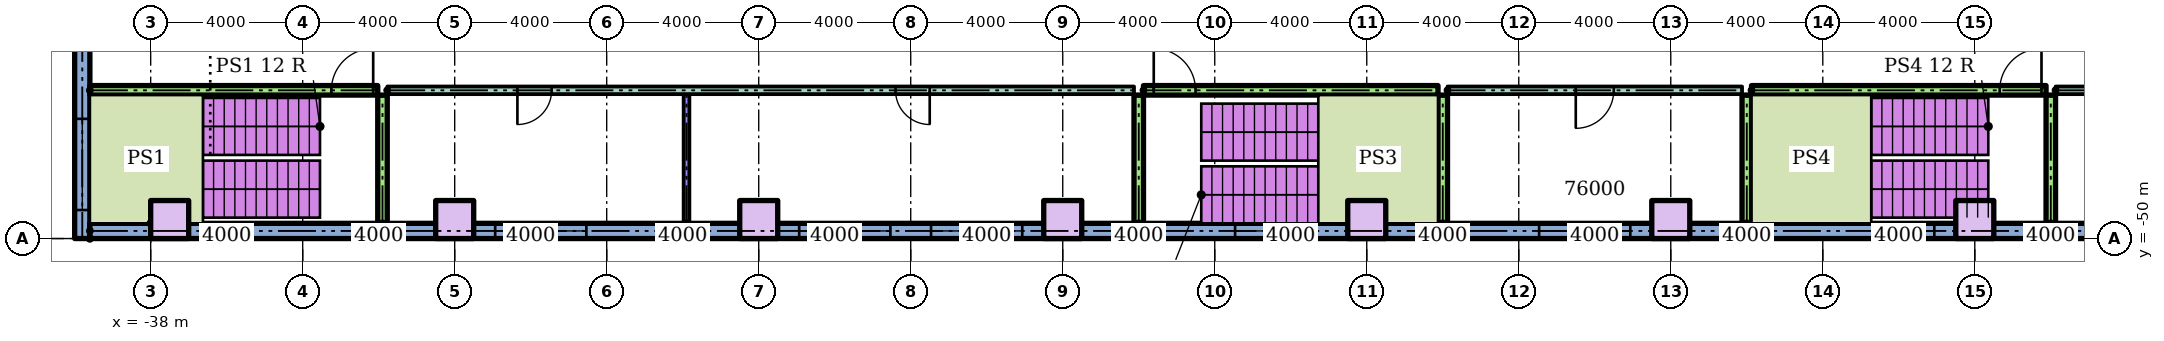
"""IFC4 building model, lengths in metres.
Left out: names, types, materials, properties, quantities, classifications, styles, units other than length and angle.
Written with IfcOpenShell. Run it as: python <this file> out.ifc"""

import sys

from ifc_helpers import new_model, si_unit, direction, frame, frame_2d, origin, origin_2d, place, context, subcontext, project, spatial, rectangle, extrude, element, fill, save


model = new_model("IFC4")
c1 = context("Model", 3, precision=1e-05, world=origin(), true_north=direction((0.0, 1.0)))
c2 = subcontext(c1, "Body", "Model", "MODEL_VIEW")
j1 = project(units=[si_unit("LENGTHUNIT", "METRE"), si_unit("PLANEANGLEUNIT", "RADIAN")], contexts=[c1])
p1 = place(None, origin())
s1 = spatial("IfcSite", under=j1, at=p1, CompositionType="ELEMENT")
p2 = place(p1, origin())
s2 = spatial("IfcBuilding", under=s1, at=p2, CompositionType="ELEMENT")
p3 = place(p2, frame((0.0, 0.0, 22.0)))
s3 = spatial("IfcBuildingStorey", under=s2, at=p3, CompositionType="ELEMENT", Elevation=22.0)
for number, where in (
    (1, (-37.5, -49.5, 0.0)),
    (2, (-30.0, -49.5, 0.0)),
    (3, (-22.0, -49.5, 0.0)),
    (4, (-14.0, -49.5, 0.0)),
    (5, (-6.0, -49.5, 0.0)),
    (6, (2.0, -49.5, 0.0)),
    (7, (10.0, -49.5, 0.0)),
):
    element("IfcColumn", number, at=place(p3, frame(where)), inside=s3, PredefinedType="COLUMN", context=c2, shape_type="SweptSolid", body=[
        extrude(rectangle(XDim=1.0, YDim=1.0, at=origin_2d()), origin(), (0.0, 0.0, 1.0), 3.7),
    ])
p4 = place(p3, frame((-39.8, 20.0, 0.0), z_axis=(0.0, 0.0, 1.0), x_axis=(0.0, -1.0, 0.0)))
e8 = element("IfcWall", 8, at=p4, inside=s3, PredefinedType="STANDARD", context=c2, shape_type="SweptSolid", body=[
    extrude(rectangle(XDim=70.0, YDim=0.4, at=frame_2d((35.0, 0.0))), origin(), (0.0, 0.0, 1.0), 3.7),
])
p5 = place(p4, frame((1.05, 0.0, 0.9)))
e9 = element("IfcOpeningElement", 9, at=p5, cuts=e8, PredefinedType="OPENING", context=c2, shape_type="SweptSolid", body=[
    extrude(rectangle(XDim=2.4, YDim=2.1, at=frame_2d((1.2, 1.05))), frame((0.0, 0.21, 0.0), z_axis=(0.0, -1.0, 0.0), x_axis=(1.0, 0.0, 0.0)), (0.0, 0.0, 1.0), 0.42),
])
p6 = place(p4, frame((5.55, 0.0, 0.9)))
e10 = element("IfcOpeningElement", 10, at=p6, cuts=e8, PredefinedType="OPENING", context=c2, shape_type="SweptSolid", body=[
    extrude(rectangle(XDim=2.4, YDim=2.1, at=frame_2d((1.2, 1.05))), frame((0.0, 0.21, 0.0), z_axis=(0.0, -1.0, 0.0), x_axis=(1.0, 0.0, 0.0)), (0.0, 0.0, 1.0), 0.42),
])
p7 = place(p4, frame((9.863, 0.0, 0.9)))
e11 = element("IfcOpeningElement", 11, at=p7, cuts=e8, PredefinedType="OPENING", context=c2, shape_type="SweptSolid", body=[
    extrude(rectangle(XDim=2.4, YDim=2.1, at=frame_2d((1.2, 1.05))), frame((0.0, 0.21, 0.0), z_axis=(0.0, -1.0, 0.0), x_axis=(1.0, 0.0, 0.0)), (0.0, 0.0, 1.0), 0.42),
])
p8 = place(p4, frame((13.988, 0.0, 0.9)))
e12 = element("IfcOpeningElement", 12, at=p8, cuts=e8, PredefinedType="OPENING", context=c2, shape_type="SweptSolid", body=[
    extrude(rectangle(XDim=2.4, YDim=2.1, at=frame_2d((1.2, 1.05))), frame((0.0, 0.21, 0.0), z_axis=(0.0, -1.0, 0.0), x_axis=(1.0, 0.0, 0.0)), (0.0, 0.0, 1.0), 0.42),
])
p9 = place(p4, frame((18.113, 0.0, 0.9)))
e13 = element("IfcOpeningElement", 13, at=p9, cuts=e8, PredefinedType="OPENING", context=c2, shape_type="SweptSolid", body=[
    extrude(rectangle(XDim=2.4, YDim=2.1, at=frame_2d((1.2, 1.05))), frame((0.0, 0.21, 0.0), z_axis=(0.0, -1.0, 0.0), x_axis=(1.0, 0.0, 0.0)), (0.0, 0.0, 1.0), 0.42),
])
p10 = place(p4, frame((22.238, 0.0, 0.9)))
e14 = element("IfcOpeningElement", 14, at=p10, cuts=e8, PredefinedType="OPENING", context=c2, shape_type="SweptSolid", body=[
    extrude(rectangle(XDim=2.4, YDim=2.1, at=frame_2d((1.2, 1.05))), frame((0.0, 0.21, 0.0), z_axis=(0.0, -1.0, 0.0), x_axis=(1.0, 0.0, 0.0)), (0.0, 0.0, 1.0), 0.42),
])
p11 = place(p4, frame((26.363, 0.0, 0.9)))
e15 = element("IfcOpeningElement", 15, at=p11, cuts=e8, PredefinedType="OPENING", context=c2, shape_type="SweptSolid", body=[
    extrude(rectangle(XDim=2.4, YDim=2.1, at=frame_2d((1.2, 1.05))), frame((0.0, 0.21, 0.0), z_axis=(0.0, -1.0, 0.0), x_axis=(1.0, 0.0, 0.0)), (0.0, 0.0, 1.0), 0.42),
])
p12 = place(p4, frame((30.488, 0.0, 0.9)))
e16 = element("IfcOpeningElement", 16, at=p12, cuts=e8, PredefinedType="OPENING", context=c2, shape_type="SweptSolid", body=[
    extrude(rectangle(XDim=2.4, YDim=2.1, at=frame_2d((1.2, 1.05))), frame((0.0, 0.21, 0.0), z_axis=(0.0, -1.0, 0.0), x_axis=(1.0, 0.0, 0.0)), (0.0, 0.0, 1.0), 0.42),
])
p13 = place(p4, frame((34.613, 0.0, 0.9)))
e17 = element("IfcOpeningElement", 17, at=p13, cuts=e8, PredefinedType="OPENING", context=c2, shape_type="SweptSolid", body=[
    extrude(rectangle(XDim=2.4, YDim=2.1, at=frame_2d((1.2, 1.05))), frame((0.0, 0.21, 0.0), z_axis=(0.0, -1.0, 0.0), x_axis=(1.0, 0.0, 0.0)), (0.0, 0.0, 1.0), 0.42),
])
p14 = place(p4, frame((38.738, 0.0, 0.9)))
e18 = element("IfcOpeningElement", 18, at=p14, cuts=e8, PredefinedType="OPENING", context=c2, shape_type="SweptSolid", body=[
    extrude(rectangle(XDim=2.4, YDim=2.1, at=frame_2d((1.2, 1.05))), frame((0.0, 0.21, 0.0), z_axis=(0.0, -1.0, 0.0), x_axis=(1.0, 0.0, 0.0)), (0.0, 0.0, 1.0), 0.42),
])
p15 = place(p4, frame((42.55, 0.0, 0.9)))
e19 = element("IfcOpeningElement", 19, at=p15, cuts=e8, PredefinedType="OPENING", context=c2, shape_type="SweptSolid", body=[
    extrude(rectangle(XDim=2.4, YDim=2.1, at=frame_2d((1.2, 1.05))), frame((0.0, 0.21, 0.0), z_axis=(0.0, -1.0, 0.0), x_axis=(1.0, 0.0, 0.0)), (0.0, 0.0, 1.0), 0.42),
])
p16 = place(p4, frame((46.05, 0.0, 0.9)))
e20 = element("IfcOpeningElement", 20, at=p16, cuts=e8, PredefinedType="OPENING", context=c2, shape_type="SweptSolid", body=[
    extrude(rectangle(XDim=2.4, YDim=2.1, at=frame_2d((1.2, 1.05))), frame((0.0, 0.21, 0.0), z_axis=(0.0, -1.0, 0.0), x_axis=(1.0, 0.0, 0.0)), (0.0, 0.0, 1.0), 0.42),
])
p17 = place(p4, frame((49.55, 0.0, 0.9)))
e21 = element("IfcOpeningElement", 21, at=p17, cuts=e8, PredefinedType="OPENING", context=c2, shape_type="SweptSolid", body=[
    extrude(rectangle(XDim=2.4, YDim=2.1, at=frame_2d((1.2, 1.05))), frame((0.0, 0.21, 0.0), z_axis=(0.0, -1.0, 0.0), x_axis=(1.0, 0.0, 0.0)), (0.0, 0.0, 1.0), 0.42),
])
p18 = place(p4, frame((53.217, 0.0, 0.9)))
e22 = element("IfcOpeningElement", 22, at=p18, cuts=e8, PredefinedType="OPENING", context=c2, shape_type="SweptSolid", body=[
    extrude(rectangle(XDim=2.4, YDim=2.1, at=frame_2d((1.2, 1.05))), frame((0.0, 0.21, 0.0), z_axis=(0.0, -1.0, 0.0), x_axis=(1.0, 0.0, 0.0)), (0.0, 0.0, 1.0), 0.42),
])
p19 = place(p4, frame((57.05, 0.0, 0.9)))
e23 = element("IfcOpeningElement", 23, at=p19, cuts=e8, PredefinedType="OPENING", context=c2, shape_type="SweptSolid", body=[
    extrude(rectangle(XDim=2.4, YDim=2.1, at=frame_2d((1.2, 1.05))), frame((0.0, 0.21, 0.0), z_axis=(0.0, -1.0, 0.0), x_axis=(1.0, 0.0, 0.0)), (0.0, 0.0, 1.0), 0.42),
])
p20 = place(p4, frame((60.883, 0.0, 0.9)))
e24 = element("IfcOpeningElement", 24, at=p20, cuts=e8, PredefinedType="OPENING", context=c2, shape_type="SweptSolid", body=[
    extrude(rectangle(XDim=2.4, YDim=2.1, at=frame_2d((1.2, 1.05))), frame((0.0, 0.21, 0.0), z_axis=(0.0, -1.0, 0.0), x_axis=(1.0, 0.0, 0.0)), (0.0, 0.0, 1.0), 0.42),
])
p21 = place(p4, frame((66.85, 0.0, 0.9)))
e25 = element("IfcOpeningElement", 25, at=p21, cuts=e8, PredefinedType="OPENING", context=c2, shape_type="SweptSolid", body=[
    extrude(rectangle(XDim=2.4, YDim=2.1, at=frame_2d((1.2, 1.05))), frame((0.0, 0.21, 0.0), z_axis=(0.0, -1.0, 0.0), x_axis=(1.0, 0.0, 0.0)), (0.0, 0.0, 1.0), 0.42),
])
p22 = place(p3, frame((-39.6, -49.8, 0.0)))
e26 = element("IfcWall", 26, at=p22, inside=s3, PredefinedType="STANDARD", context=c2, shape_type="SweptSolid", body=[
    extrude(rectangle(XDim=79.2, YDim=0.4, at=frame_2d((39.6, 0.0))), origin(), (0.0, 0.0, 1.0), 3.7),
])
p23 = place(p22, frame((10.665, 0.0, 0.9)))
e27 = element("IfcOpeningElement", 27, at=p23, cuts=e26, PredefinedType="OPENING", context=c2, shape_type="SweptSolid", body=[
    extrude(rectangle(XDim=2.4, YDim=2.1, at=frame_2d((1.2, 1.05))), frame((0.0, 0.21, 0.0), z_axis=(0.0, -1.0, 0.0), x_axis=(1.0, 0.0, 0.0)), (0.0, 0.0, 1.0), 0.42),
])
p24 = place(p22, frame((18.665, 0.0, 0.9)))
e28 = element("IfcOpeningElement", 28, at=p24, cuts=e26, PredefinedType="OPENING", context=c2, shape_type="SweptSolid", body=[
    extrude(rectangle(XDim=2.4, YDim=2.1, at=frame_2d((1.2, 1.05))), frame((0.0, 0.21, 0.0), z_axis=(0.0, -1.0, 0.0), x_axis=(1.0, 0.0, 0.0)), (0.0, 0.0, 1.0), 0.42),
])
p25 = place(p22, frame((22.135, 0.0, 0.9)))
e29 = element("IfcOpeningElement", 29, at=p25, cuts=e26, PredefinedType="OPENING", context=c2, shape_type="SweptSolid", body=[
    extrude(rectangle(XDim=2.4, YDim=2.1, at=frame_2d((1.2, 1.05))), frame((0.0, 0.21, 0.0), z_axis=(0.0, -1.0, 0.0), x_axis=(1.0, 0.0, 0.0)), (0.0, 0.0, 1.0), 0.42),
])
p26 = place(p22, frame((30.135, 0.0, 0.9)))
e30 = element("IfcOpeningElement", 30, at=p26, cuts=e26, PredefinedType="OPENING", context=c2, shape_type="SweptSolid", body=[
    extrude(rectangle(XDim=2.05, YDim=2.1, at=frame_2d((1.025, 1.05))), frame((0.0, 0.21, 0.0), z_axis=(0.0, -1.0, 0.0), x_axis=(1.0, 0.0, 0.0)), (0.0, 0.0, 1.0), 0.42),
])
p27 = place(p22, frame((38.135, 0.0, 0.9)))
e31 = element("IfcOpeningElement", 31, at=p27, cuts=e26, PredefinedType="OPENING", context=c2, shape_type="SweptSolid", body=[
    extrude(rectangle(XDim=2.4, YDim=2.1, at=frame_2d((1.2, 1.05))), frame((0.0, 0.21, 0.0), z_axis=(0.0, -1.0, 0.0), x_axis=(1.0, 0.0, 0.0)), (0.0, 0.0, 1.0), 0.42),
])
p28 = place(p22, frame((47.015, 0.0, 0.9)))
e32 = element("IfcOpeningElement", 32, at=p28, cuts=e26, PredefinedType="OPENING", context=c2, shape_type="SweptSolid", body=[
    extrude(rectangle(XDim=1.52, YDim=2.1, at=frame_2d((0.76, 1.05))), frame((0.0, 0.21, 0.0), z_axis=(0.0, -1.0, 0.0), x_axis=(1.0, 0.0, 0.0)), (0.0, 0.0, 1.0), 0.42),
])
p29 = place(p22, frame((54.135, 0.0, 0.9)))
e33 = element("IfcOpeningElement", 33, at=p29, cuts=e26, PredefinedType="OPENING", context=c2, shape_type="SweptSolid", body=[
    extrude(rectangle(XDim=2.4, YDim=2.1, at=frame_2d((1.2, 1.05))), frame((0.0, 0.21, 0.0), z_axis=(0.0, -1.0, 0.0), x_axis=(1.0, 0.0, 0.0)), (0.0, 0.0, 1.0), 0.42),
])
p30 = place(p3, frame((-31.775, -46.1, 0.0)))
e34 = element("IfcWall", 34, at=p30, inside=s3, PredefinedType="PARTITIONING", context=c2, shape_type="SweptSolid", body=[
    extrude(rectangle(XDim=19.65, YDim=0.2, at=frame_2d((9.825, 0.0))), origin(), (0.0, 0.0, 1.0), 3.2),
])
p31 = place(p30, frame((3.425, 0.0, 0.0)))
e35 = element("IfcOpeningElement", 35, at=p31, cuts=e34, PredefinedType="OPENING", context=c2, shape_type="SweptSolid", body=[
    extrude(rectangle(XDim=0.9, YDim=2.1, at=frame_2d((0.45, 1.05))), frame((0.0, 0.11, 0.0), z_axis=(0.0, -1.0, 0.0), x_axis=(1.0, 0.0, 0.0)), (0.0, 0.0, 1.0), 0.22),
])
p32 = place(p30, frame((13.375, 0.0, 0.0)))
e36 = element("IfcOpeningElement", 36, at=p32, cuts=e34, PredefinedType="OPENING", context=c2, shape_type="SweptSolid", body=[
    extrude(rectangle(XDim=0.9, YDim=2.1, at=frame_2d((0.45, 1.05))), frame((0.0, 0.11, 0.0), z_axis=(0.0, -1.0, 0.0), x_axis=(1.0, 0.0, 0.0)), (0.0, 0.0, 1.0), 0.22),
])
p33 = place(p3, frame((-3.875, -46.1, 0.0)))
e37 = element("IfcWall", 37, at=p33, inside=s3, PredefinedType="PARTITIONING", context=c2, shape_type="SweptSolid", body=[
    extrude(rectangle(XDim=7.75, YDim=0.2, at=frame_2d((3.875, 0.0))), origin(), (0.0, 0.0, 1.0), 3.2),
])
p34 = place(p33, frame((3.375, 0.0, 0.0)))
e38 = element("IfcOpeningElement", 38, at=p34, cuts=e37, PredefinedType="OPENING", context=c2, shape_type="SweptSolid", body=[
    extrude(rectangle(XDim=1.0, YDim=2.1, at=frame_2d((0.5, 1.05))), frame((0.0, 0.11, 0.0), z_axis=(0.0, -1.0, 0.0), x_axis=(1.0, 0.0, 0.0)), (0.0, 0.0, 1.0), 0.22),
])
p35 = place(p3, frame((12.125, -46.1, 0.0)))
e39 = element("IfcWall", 39, at=p35, inside=s3, PredefinedType="PARTITIONING", context=c2, shape_type="SweptSolid", body=[
    extrude(rectangle(XDim=19.65, YDim=0.2, at=frame_2d((9.825, 0.0))), origin(), (0.0, 0.0, 1.0), 3.2),
])
p36 = place(p35, frame((4.325, 0.0, 0.0)))
e40 = element("IfcOpeningElement", 40, at=p36, cuts=e39, PredefinedType="OPENING", context=c2, shape_type="SweptSolid", body=[
    extrude(rectangle(XDim=0.9, YDim=2.1, at=frame_2d((0.45, 1.05))), frame((0.0, 0.11, 0.0), z_axis=(0.0, -1.0, 0.0), x_axis=(1.0, 0.0, 0.0)), (0.0, 0.0, 1.0), 0.22),
])
p37 = place(p35, frame((15.325, 0.0, 0.0)))
e41 = element("IfcOpeningElement", 41, at=p37, cuts=e39, PredefinedType="OPENING", context=c2, shape_type="SweptSolid", body=[
    extrude(rectangle(XDim=0.9, YDim=2.1, at=frame_2d((0.45, 1.05))), frame((0.0, 0.11, 0.0), z_axis=(0.0, -1.0, 0.0), x_axis=(1.0, 0.0, 0.0)), (0.0, 0.0, 1.0), 0.22),
])
p38 = place(p3, frame((-39.6, -46.1, 0.0)))
e42 = element("IfcWall", 42, at=p38, inside=s3, PredefinedType="SOLIDWALL", context=c2, shape_type="SweptSolid", body=[
    extrude(rectangle(XDim=7.575, YDim=0.25, at=frame_2d((3.788, 0.0))), origin(), (0.0, 0.0, 1.0), 3.7),
])
p39 = place(p38, frame((6.355, 0.0, 0.0)))
e43 = element("IfcOpeningElement", 43, at=p39, cuts=e42, PredefinedType="OPENING", context=c2, shape_type="SweptSolid", body=[
    extrude(rectangle(XDim=1.1, YDim=2.1, at=frame_2d((0.55, 1.05))), frame((0.0, 0.135, 0.0), z_axis=(0.0, -1.0, 0.0), x_axis=(1.0, 0.0, 0.0)), (0.0, 0.0, 1.0), 0.27),
])
p40 = place(p3, frame((-11.875, -46.1, 0.0)))
e44 = element("IfcWall", 44, at=p40, inside=s3, PredefinedType="SOLIDWALL", context=c2, shape_type="SweptSolid", body=[
    extrude(rectangle(XDim=7.75, YDim=0.25, at=frame_2d((3.875, 0.0))), origin(), (0.0, 0.0, 1.0), 3.7),
])
p41 = place(p40, frame((0.27, 0.0, 0.0)))
e45 = element("IfcOpeningElement", 45, at=p41, cuts=e44, PredefinedType="OPENING", context=c2, shape_type="SweptSolid", body=[
    extrude(rectangle(XDim=1.1, YDim=2.1, at=frame_2d((0.55, 1.05))), frame((0.0, 0.135, 0.0), z_axis=(0.0, -1.0, 0.0), x_axis=(1.0, 0.0, 0.0)), (0.0, 0.0, 1.0), 0.27),
])
p42 = place(p3, frame((4.125, -46.1, 0.0)))
e46 = element("IfcWall", 46, at=p42, inside=s3, PredefinedType="SOLIDWALL", context=c2, shape_type="SweptSolid", body=[
    extrude(rectangle(XDim=7.75, YDim=0.25, at=frame_2d((3.875, 0.0))), origin(), (0.0, 0.0, 1.0), 3.7),
])
p43 = place(p42, frame((6.53, 0.0, 0.0)))
e47 = element("IfcOpeningElement", 47, at=p43, cuts=e46, PredefinedType="OPENING", context=c2, shape_type="SweptSolid", body=[
    extrude(rectangle(XDim=1.1, YDim=2.1, at=frame_2d((0.55, 1.05))), frame((0.0, 0.135, 0.0), z_axis=(0.0, -1.0, 0.0), x_axis=(1.0, 0.0, 0.0)), (0.0, 0.0, 1.0), 0.27),
])
p44 = place(p3, frame((-31.9, -49.6, 0.0), z_axis=(0.0, 0.0, 1.0), x_axis=(0.0, 1.0, 0.0)))
e48 = element("IfcWall", 48, at=p44, inside=s3, PredefinedType="SOLIDWALL", context=c2, shape_type="SweptSolid", body=[
    extrude(rectangle(XDim=3.375, YDim=0.25, at=frame_2d((1.688, 0.0))), origin(), (0.0, 0.0, 1.0), 3.7),
])
p45 = place(p3, frame((-23.9, -49.6, 0.0), z_axis=(0.0, 0.0, 1.0), x_axis=(0.0, 1.0, 0.0)))
e49 = element("IfcWall", 49, at=p45, inside=s3, PredefinedType="PARTITIONING", context=c2, shape_type="SweptSolid", body=[
    extrude(rectangle(XDim=3.4, YDim=0.15, at=frame_2d((1.7, 0.0))), origin(), (0.0, 0.0, 1.0), 3.2),
])
for number, where, z_axis, x_axis in (
    (50, (-12.0, -49.6, 0.0), (0.0, 0.0, 1.0), (0.0, 1.0, 0.0)),
    (51, (-4.0, -49.6, 0.0), (0.0, 0.0, 1.0), (0.0, 1.0, 0.0)),
    (52, (4.0, -49.6, 0.0), (0.0, 0.0, 1.0), (0.0, 1.0, 0.0)),
    (53, (12.0, -49.6, 0.0), (0.0, 0.0, 1.0), (0.0, 1.0, 0.0)),
):
    element("IfcWall", number, at=place(p3, frame(where, z_axis=z_axis, x_axis=x_axis)), inside=s3, PredefinedType="SOLIDWALL", context=c2, shape_type="SweptSolid", body=[
        extrude(rectangle(XDim=3.375, YDim=0.25, at=frame_2d((1.688, 0.0))), origin(), (0.0, 0.0, 1.0), 3.7),
    ])
p46 = place(p21, origin())
e54 = element("IfcWindow", 54, at=p46, inside=s3, PartitioningType="SINGLE_PANEL", PredefinedType="WINDOW", context=c2, shape_type="SweptSolid", body=[
    extrude(rectangle(XDim=2.4, YDim=2.1, at=frame_2d((1.2, 1.05))), frame((0.0, 0.03, 0.0), z_axis=(0.0, -1.0, 0.0), x_axis=(1.0, 0.0, 0.0)), (0.0, 0.0, 1.0), 0.06),
])
fill(e25, e54)
p47 = place(p23, origin())
e55 = element("IfcWindow", 55, at=p47, inside=s3, PartitioningType="SINGLE_PANEL", PredefinedType="WINDOW", context=c2, shape_type="SweptSolid", body=[
    extrude(rectangle(XDim=2.4, YDim=2.1, at=frame_2d((1.2, 1.05))), frame((0.0, 0.03, 0.0), z_axis=(0.0, -1.0, 0.0), x_axis=(1.0, 0.0, 0.0)), (0.0, 0.0, 1.0), 0.06),
])
fill(e27, e55)
p48 = place(p24, origin())
e56 = element("IfcWindow", 56, at=p48, inside=s3, PartitioningType="SINGLE_PANEL", PredefinedType="WINDOW", context=c2, shape_type="SweptSolid", body=[
    extrude(rectangle(XDim=2.4, YDim=2.1, at=frame_2d((1.2, 1.05))), frame((0.0, 0.03, 0.0), z_axis=(0.0, -1.0, 0.0), x_axis=(1.0, 0.0, 0.0)), (0.0, 0.0, 1.0), 0.06),
])
fill(e28, e56)
p49 = place(p25, origin())
e57 = element("IfcWindow", 57, at=p49, inside=s3, PartitioningType="SINGLE_PANEL", PredefinedType="WINDOW", context=c2, shape_type="SweptSolid", body=[
    extrude(rectangle(XDim=2.4, YDim=2.1, at=frame_2d((1.2, 1.05))), frame((0.0, 0.03, 0.0), z_axis=(0.0, -1.0, 0.0), x_axis=(1.0, 0.0, 0.0)), (0.0, 0.0, 1.0), 0.06),
])
fill(e29, e57)
p50 = place(p26, origin())
e58 = element("IfcWindow", 58, at=p50, inside=s3, PartitioningType="SINGLE_PANEL", PredefinedType="WINDOW", context=c2, shape_type="SweptSolid", body=[
    extrude(rectangle(XDim=2.05, YDim=2.1, at=frame_2d((1.025, 1.05))), frame((0.0, 0.03, 0.0), z_axis=(0.0, -1.0, 0.0), x_axis=(1.0, 0.0, 0.0)), (0.0, 0.0, 1.0), 0.06),
])
fill(e30, e58)
p51 = place(p27, origin())
e59 = element("IfcWindow", 59, at=p51, inside=s3, PartitioningType="SINGLE_PANEL", PredefinedType="WINDOW", context=c2, shape_type="SweptSolid", body=[
    extrude(rectangle(XDim=2.4, YDim=2.1, at=frame_2d((1.2, 1.05))), frame((0.0, 0.03, 0.0), z_axis=(0.0, -1.0, 0.0), x_axis=(1.0, 0.0, 0.0)), (0.0, 0.0, 1.0), 0.06),
])
fill(e31, e59)
p52 = place(p28, origin())
e60 = element("IfcWindow", 60, at=p52, inside=s3, PartitioningType="SINGLE_PANEL", PredefinedType="WINDOW", context=c2, shape_type="SweptSolid", body=[
    extrude(rectangle(XDim=1.52, YDim=2.1, at=frame_2d((0.76, 1.05))), frame((0.0, 0.03, 0.0), z_axis=(0.0, -1.0, 0.0), x_axis=(1.0, 0.0, 0.0)), (0.0, 0.0, 1.0), 0.06),
])
fill(e32, e60)
p53 = place(p31, frame((0.9, 0.0, 0.0), z_axis=(0.0, 0.0, 1.0), x_axis=(-1.0, 0.0, 0.0)))
e61 = element("IfcDoor", 61, at=p53, inside=s3, OperationType="SINGLE_SWING_LEFT", PredefinedType="DOOR", context=c2, shape_type="SweptSolid", body=[
    extrude(rectangle(XDim=0.9, YDim=2.1, at=frame_2d((0.45, 1.05))), frame((0.0, 0.025, 0.0), z_axis=(0.0, -1.0, 0.0), x_axis=(1.0, 0.0, 0.0)), (0.0, 0.0, 1.0), 0.05),
])
fill(e35, e61)
p54 = place(p32, frame((0.9, 0.0, 0.0), z_axis=(0.0, 0.0, 1.0), x_axis=(-1.0, 0.0, 0.0)))
e62 = element("IfcDoor", 62, at=p54, inside=s3, OperationType="SINGLE_SWING_RIGHT", PredefinedType="DOOR", context=c2, shape_type="SweptSolid", body=[
    extrude(rectangle(XDim=0.9, YDim=2.1, at=frame_2d((0.45, 1.05))), frame((0.0, 0.025, 0.0), z_axis=(0.0, -1.0, 0.0), x_axis=(1.0, 0.0, 0.0)), (0.0, 0.0, 1.0), 0.05),
])
fill(e36, e62)
p55 = place(p34, frame((1.0, 0.0, 0.0), z_axis=(0.0, 0.0, 1.0), x_axis=(-1.0, 0.0, 0.0)))
e63 = element("IfcDoor", 63, at=p55, inside=s3, OperationType="SINGLE_SWING_LEFT", PredefinedType="DOOR", context=c2, shape_type="SweptSolid", body=[
    extrude(rectangle(XDim=1.0, YDim=2.1, at=frame_2d((0.5, 1.05))), frame((0.0, 0.025, 0.0), z_axis=(0.0, -1.0, 0.0), x_axis=(1.0, 0.0, 0.0)), (0.0, 0.0, 1.0), 0.05),
])
fill(e38, e63)
p56 = place(p39, origin())
e64 = element("IfcDoor", 64, at=p56, inside=s3, OperationType="SINGLE_SWING_RIGHT", PredefinedType="DOOR", context=c2, shape_type="SweptSolid", body=[
    extrude(rectangle(XDim=1.1, YDim=2.1, at=frame_2d((0.55, 1.05))), frame((0.0, 0.025, 0.0), z_axis=(0.0, -1.0, 0.0), x_axis=(1.0, 0.0, 0.0)), (0.0, 0.0, 1.0), 0.05),
])
fill(e43, e64)
p57 = place(p41, origin())
e65 = element("IfcDoor", 65, at=p57, inside=s3, OperationType="SINGLE_SWING_LEFT", PredefinedType="DOOR", context=c2, shape_type="SweptSolid", body=[
    extrude(rectangle(XDim=1.1, YDim=2.1, at=frame_2d((0.55, 1.05))), frame((0.0, 0.025, 0.0), z_axis=(0.0, -1.0, 0.0), x_axis=(1.0, 0.0, 0.0)), (0.0, 0.0, 1.0), 0.05),
])
fill(e45, e65)
p58 = place(p43, origin())
e66 = element("IfcDoor", 66, at=p58, inside=s3, OperationType="SINGLE_SWING_RIGHT", PredefinedType="DOOR", context=c2, shape_type="SweptSolid", body=[
    extrude(rectangle(XDim=1.1, YDim=2.1, at=frame_2d((0.55, 1.05))), frame((0.0, 0.025, 0.0), z_axis=(0.0, -1.0, 0.0), x_axis=(1.0, 0.0, 0.0)), (0.0, 0.0, 1.0), 0.05),
])
fill(e47, e66)
save(model, sys.argv[1])
